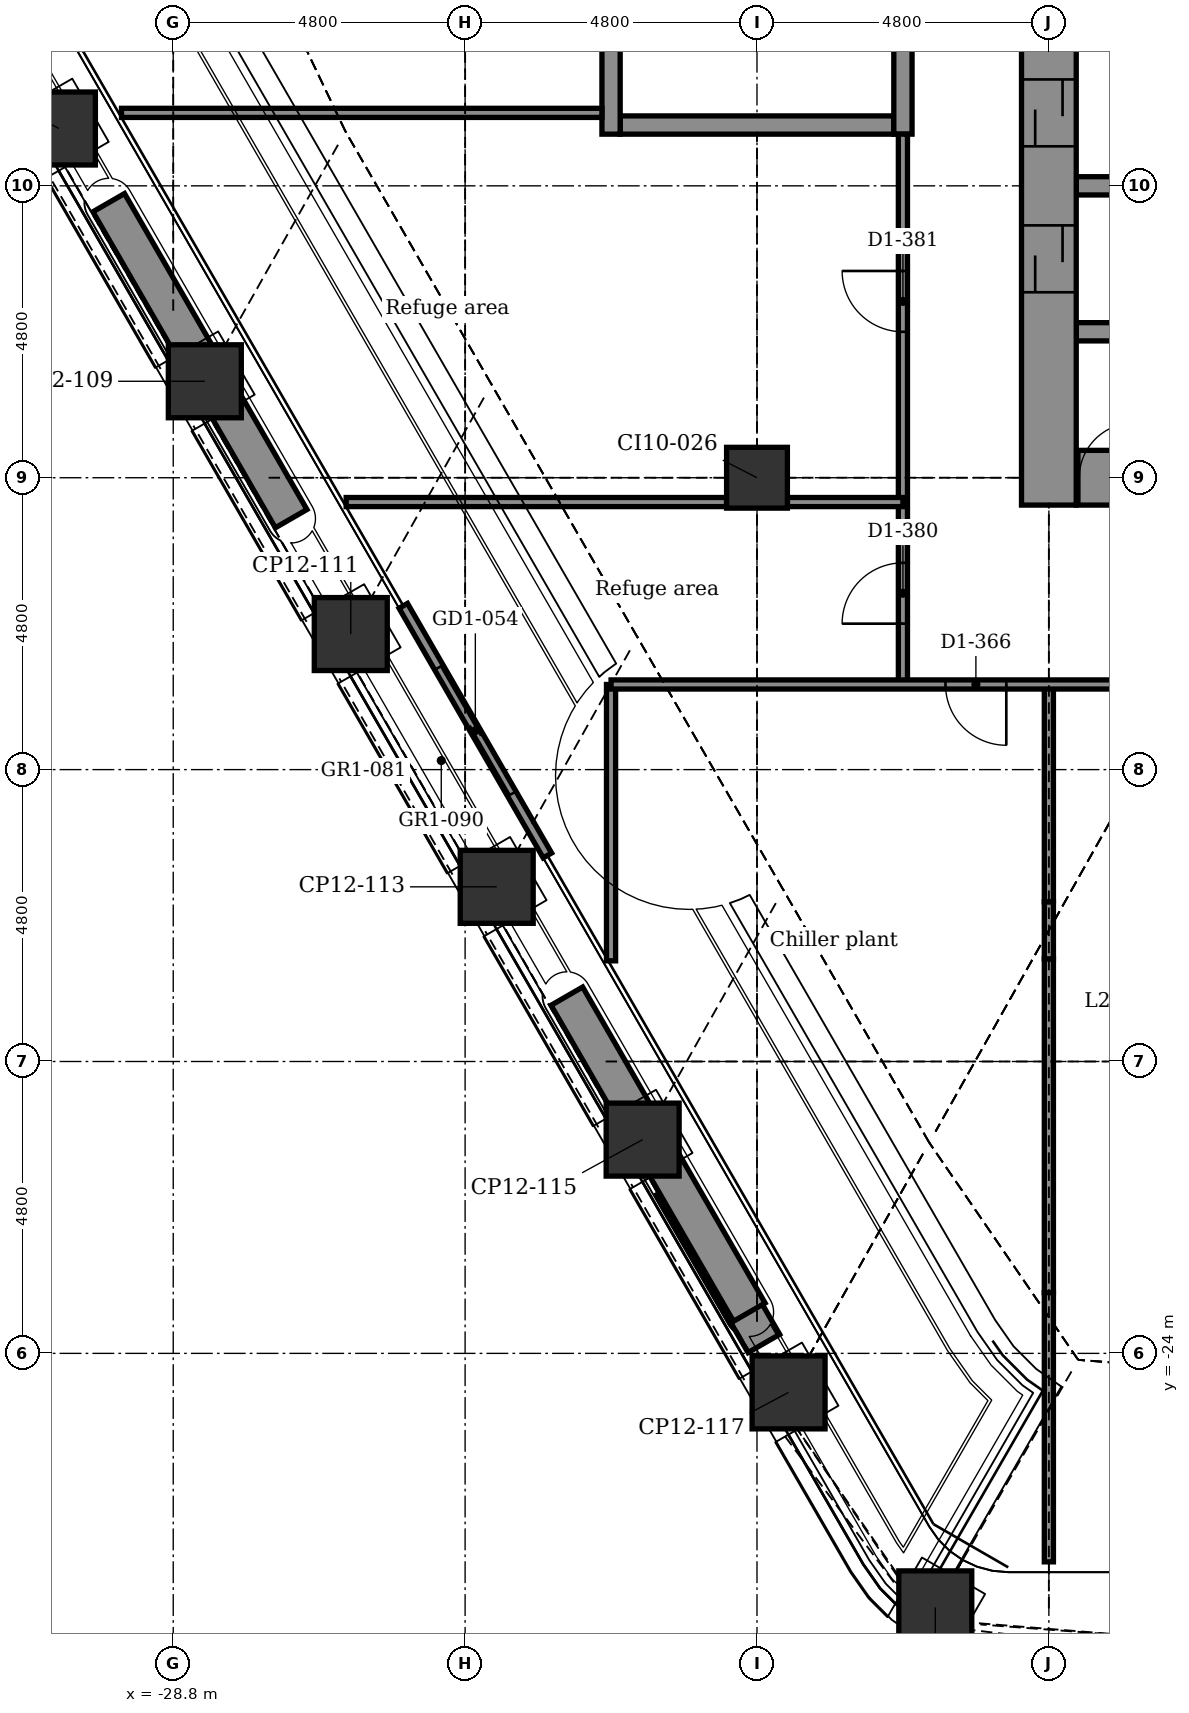
"""IFC4 building model, lengths in metres.
Left out: names, types, materials, properties, quantities, classifications, styles, units other than length and angle.
Written with IfcOpenShell. Run it as: python <this file> out.ifc"""

import sys

from ifc_helpers import new_model, si_unit, direction, frame, frame_2d, origin, origin_2d, place, context, subcontext, project, spatial, rectangle, extrude, element, fill, save


model = new_model("IFC4")
c1 = context("Model", 3, precision=1e-05, world=origin(), true_north=direction((0.0, 1.0)))
c2 = subcontext(c1, "Body", "Model", "MODEL_VIEW")
j1 = project(units=[si_unit("LENGTHUNIT", "METRE"), si_unit("PLANEANGLEUNIT", "RADIAN")], contexts=[c1])
p1 = place(None, origin())
s1 = spatial("IfcSite", under=j1, at=p1, CompositionType="ELEMENT")
p2 = place(p1, origin())
s2 = spatial("IfcBuilding", under=s1, at=p2, CompositionType="ELEMENT")
p3 = place(p2, frame((0.0, 0.0, 127.4)))
s3 = spatial("IfcBuildingStorey", under=s2, at=p3, CompositionType="ELEMENT", Elevation=127.4)
for number, where, z_axis, x_axis in (
    (1, (-16.268, -28.177, -0.3), (0.0, 0.0, 1.0), (0.5, 0.866, 0.0)),
    (2, (-18.68, -24.642, -0.3), (0.0, 0.0, 1.0), (0.866, 0.5, 0.0)),
    (3, (-21.08, -20.485, -0.3), (0.0, 0.0, 1.0), (0.866, 0.5, 0.0)),
    (4, (-23.48, -16.328, -0.3), (0.0, 0.0, 1.0), (0.866, 0.5, 0.0)),
    (5, (-25.88, -12.171, -0.3), (0.0, 0.0, 1.0), (0.866, 0.5, 0.0)),
    (6, (-28.28, -8.014, -0.3), (0.0, 0.0, 1.0), (0.866, 0.5, 0.0)),
    (7, (-30.68, -3.857, -0.3), (0.0, 0.0, 1.0), (0.866, 0.5, 0.0)),
):
    element("IfcColumn", number, at=place(p3, frame(where, z_axis=z_axis, x_axis=x_axis)), inside=s3, PredefinedType="COLUMN", context=c2, shape_type="SweptSolid", body=[
        extrude(rectangle(XDim=1.2, YDim=1.2, at=origin_2d()), origin(), (0.0, 0.0, 1.0), 6.15),
    ])
p4 = place(p3, frame((-19.2, -9.6, -0.3), z_axis=(0.0, 0.0, 1.0), x_axis=(1.0, 0.0, 0.0)))
e8 = element("IfcColumn", 8, at=p4, inside=s3, PredefinedType="COLUMN", context=c2, shape_type="SweptSolid", body=[
    extrude(rectangle(XDim=1.0, YDim=1.0, at=origin_2d()), origin(), (0.0, 0.0, 1.0), 6.15),
])
p5 = place(p3, frame((-13.95, -9.6, -0.3), z_axis=(0.0, 0.0, 1.0), x_axis=(1.0, 0.0, 0.0)))
e9 = element("IfcWall", 9, at=p5, inside=s3, PredefinedType="SHEAR", context=c2, shape_type="SweptSolid", body=[
    extrude(rectangle(XDim=3.9, YDim=0.9, at=frame_2d((1.95, 0.0))), origin(), (0.0, 0.0, 1.0), 6.15),
])
p6 = place(p5, frame((0.05, 0.0, 0.3)))
e10 = element("IfcOpeningElement", 10, at=p6, cuts=e9, PredefinedType="OPENING", context=c2, shape_type="SweptSolid", body=[
    extrude(rectangle(XDim=0.9, YDim=2.1, at=frame_2d((0.45, 1.05))), frame((0.0, 0.46, 0.0), z_axis=(0.0, -1.0, 0.0), x_axis=(1.0, 0.0, 0.0)), (0.0, 0.0, 1.0), 0.92),
])
p7 = place(p5, frame((1.5, 0.0, 0.3)))
e11 = element("IfcOpeningElement", 11, at=p7, cuts=e9, PredefinedType="OPENING", context=c2, shape_type="SweptSolid", body=[
    extrude(rectangle(XDim=0.9, YDim=2.1, at=frame_2d((0.45, 1.05))), frame((0.0, 0.46, 0.0), z_axis=(0.0, -1.0, 0.0), x_axis=(1.0, 0.0, 0.0)), (0.0, 0.0, 1.0), 0.92),
])
p8 = place(p5, frame((2.95, 0.0, 0.3)))
e12 = element("IfcOpeningElement", 12, at=p8, cuts=e9, PredefinedType="OPENING", context=c2, shape_type="SweptSolid", body=[
    extrude(rectangle(XDim=0.9, YDim=2.1, at=frame_2d((0.45, 1.05))), frame((0.0, 0.46, 0.0), z_axis=(0.0, -1.0, 0.0), x_axis=(1.0, 0.0, 0.0)), (0.0, 0.0, 1.0), 0.92),
])
p9 = place(p3, frame((-13.95, -7.2, -0.3), z_axis=(0.0, 0.0, 1.0), x_axis=(1.0, 0.0, 0.0)))
e13 = element("IfcWall", 13, at=p9, inside=s3, PredefinedType="STANDARD", context=c2, shape_type="SweptSolid", body=[
    extrude(rectangle(XDim=3.9, YDim=0.3, at=frame_2d((1.95, 0.0))), origin(), (0.0, 0.0, 1.0), 6.15),
])
p10 = place(p3, frame((-13.95, -4.8, -0.3), z_axis=(0.0, 0.0, 1.0), x_axis=(1.0, 0.0, 0.0)))
e14 = element("IfcWall", 14, at=p10, inside=s3, PredefinedType="STANDARD", context=c2, shape_type="SweptSolid", body=[
    extrude(rectangle(XDim=3.9, YDim=0.3, at=frame_2d((1.95, 0.0))), origin(), (0.0, 0.0, 1.0), 4.7),
])
p11 = place(p3, frame((-21.45, -3.8, -0.3), z_axis=(0.0, 0.0, 1.0), x_axis=(1.0, 0.0, 0.0)))
e15 = element("IfcWall", 15, at=p11, inside=s3, PredefinedType="STANDARD", context=c2, shape_type="SweptSolid", body=[
    extrude(rectangle(XDim=4.5, YDim=0.3, at=frame_2d((2.25, 0.0))), origin(), (0.0, 0.0, 1.0), 6.15),
])
p12 = place(p3, frame((-21.6, -3.95, -0.3), z_axis=(0.0, 0.0, 1.0), x_axis=(0.0, 1.0, 0.0)))
e16 = element("IfcWall", 16, at=p12, inside=s3, PredefinedType="STANDARD", context=c2, shape_type="SweptSolid", body=[
    extrude(rectangle(XDim=7.9, YDim=0.3, at=frame_2d((3.95, 0.0))), origin(), (0.0, 0.0, 1.0), 6.15),
])
p13 = place(p3, frame((-16.8, -3.95, -0.3), z_axis=(0.0, 0.0, 1.0), x_axis=(0.0, 1.0, 0.0)))
e17 = element("IfcWall", 17, at=p13, inside=s3, PredefinedType="STANDARD", context=c2, shape_type="SweptSolid", body=[
    extrude(rectangle(XDim=7.9, YDim=0.3, at=frame_2d((3.95, 0.0))), origin(), (0.0, 0.0, 1.0), 6.15),
])
p14 = place(p13, frame((6.35, 0.0, 0.3)))
e18 = element("IfcOpeningElement", 18, at=p14, cuts=e17, PredefinedType="OPENING", context=c2, shape_type="SweptSolid", body=[
    extrude(rectangle(XDim=1.2, YDim=2.1, at=frame_2d((0.6, 1.05))), frame((0.0, 0.16, 0.0), z_axis=(0.0, -1.0, 0.0), x_axis=(1.0, 0.0, 0.0)), (0.0, 0.0, 1.0), 0.32),
])
p15 = place(p3, frame((-14.4, -10.05, -0.3), z_axis=(0.0, 0.0, 1.0), x_axis=(0.0, 1.0, 0.0)))
e19 = element("IfcWall", 19, at=p15, inside=s3, PredefinedType="SHEAR", context=c2, shape_type="SweptSolid", body=[
    extrude(rectangle(XDim=20.1, YDim=0.9, at=frame_2d((10.05, 0.0))), origin(), (0.0, 0.0, 1.0), 6.15),
])
p16 = place(p15, frame((3.5, 0.0, 0.3)))
e20 = element("IfcOpeningElement", 20, at=p16, cuts=e19, PredefinedType="OPENING", context=c2, shape_type="SweptSolid", body=[
    extrude(rectangle(XDim=1.1, YDim=2.1, at=frame_2d((0.55, 1.05))), frame((0.0, 0.46, 0.0), z_axis=(0.0, -1.0, 0.0), x_axis=(1.0, 0.0, 0.0)), (0.0, 0.0, 1.0), 0.92),
])
p17 = place(p15, frame((5.9, 0.0, 0.3)))
e21 = element("IfcOpeningElement", 21, at=p17, cuts=e19, PredefinedType="OPENING", context=c2, shape_type="SweptSolid", body=[
    extrude(rectangle(XDim=1.1, YDim=2.1, at=frame_2d((0.55, 1.05))), frame((0.0, 0.46, 0.0), z_axis=(0.0, -1.0, 0.0), x_axis=(1.0, 0.0, 0.0)), (0.0, 0.0, 1.0), 0.92),
])
p18 = place(p15, frame((8.3, 0.0, 0.3)))
e22 = element("IfcOpeningElement", 22, at=p18, cuts=e19, PredefinedType="OPENING", context=c2, shape_type="SweptSolid", body=[
    extrude(rectangle(XDim=1.1, YDim=2.1, at=frame_2d((0.55, 1.05))), frame((0.0, 0.46, 0.0), z_axis=(0.0, -1.0, 0.0), x_axis=(1.0, 0.0, 0.0)), (0.0, 0.0, 1.0), 0.92),
])
p19 = place(p15, frame((10.7, 0.0, 0.3)))
e23 = element("IfcOpeningElement", 23, at=p19, cuts=e19, PredefinedType="OPENING", context=c2, shape_type="SweptSolid", body=[
    extrude(rectangle(XDim=1.1, YDim=2.1, at=frame_2d((0.55, 1.05))), frame((0.0, 0.46, 0.0), z_axis=(0.0, -1.0, 0.0), x_axis=(1.0, 0.0, 0.0)), (0.0, 0.0, 1.0), 0.92),
])
p20 = place(p3, frame((-22.647, -15.812, 0.0), z_axis=(0.0, 0.0, 1.0), x_axis=(-0.499978080042, 0.866038058908, 0.0)))
e24 = element("IfcWall", 24, at=p20, inside=s3, PredefinedType="PARTITIONING", context=c2, shape_type="SweptSolid", body=[
    extrude(rectangle(XDim=4.74, YDim=0.16, at=frame_2d((2.37, 0.0))), origin(), (0.0, 0.0, 1.0), 5.7),
])
p21 = place(p20, frame((1.17, 0.0, 0.0)))
e25 = element("IfcOpeningElement", 25, at=p21, cuts=e24, PredefinedType="OPENING", context=c2, shape_type="SweptSolid", body=[
    extrude(rectangle(XDim=2.4, YDim=2.4, at=frame_2d((1.2, 1.2))), frame((0.0, 0.09, 0.0), z_axis=(0.0, -1.0, 0.0), x_axis=(1.0, 0.0, 0.0)), (0.0, 0.0, 1.0), 0.18),
])
p22 = place(p3, frame((-19.087, -23.837, 0.0), z_axis=(0.0, 0.0, 1.0), x_axis=(-0.499990139034, 0.866031096941, 0.0)))
e26 = element("IfcWall", 26, at=p22, inside=s3, PredefinedType="USERDEFINED", context=c2, shape_type="SweptSolid", body=[
    extrude(rectangle(XDim=3.0, YDim=0.6, at=frame_2d((1.5, 0.0))), origin(), (0.0, 0.0, 1.0), 0.7),
])
for number, where, z_axis, x_axis in (
    (27, (-19.327, -23.322, 6.0), (0.0, 0.0, 1.0), (-0.5, 0.866, 0.0)),
    (28, (-26.861, -10.273, 6.0), (0.0, 0.0, 1.0), (-0.5, 0.866, 0.0)),
):
    element("IfcWall", number, at=place(p3, frame(where, z_axis=z_axis, x_axis=x_axis)), inside=s3, PredefinedType="USERDEFINED", context=c2, shape_type="SweptSolid", body=[
        extrude(rectangle(XDim=6.0, YDim=0.6, at=frame_2d((3.0, 0.0))), origin(), (0.0, 0.0, 1.0), 0.7),
    ])
p23 = place(p3, frame((-14.4, -23.001, 0.0), z_axis=(0.0, 0.0, 1.0), x_axis=(0.0, 1.0, 0.0)))
e29 = element("IfcWall", 29, at=p23, inside=s3, PredefinedType="PARTITIONING", context=c2, shape_type="SweptSolid", body=[
    extrude(rectangle(XDim=5.489, YDim=0.15, at=frame_2d((2.745, 0.0))), origin(), (0.0, 0.0, 1.0), 5.54),
])
p24 = place(p3, frame((-14.4, -27.428, 0.0), z_axis=(0.0, 0.0, 1.0), x_axis=(0.0, 1.0, 0.0)))
e30 = element("IfcWall", 30, at=p24, inside=s3, PredefinedType="PARTITIONING", context=c2, shape_type="SweptSolid", body=[
    extrude(rectangle(XDim=4.427, YDim=0.15, at=frame_2d((2.213, 0.0))), origin(), (0.0, 0.0, 1.0), 5.7),
])
p25 = place(p3, frame((-14.4, -17.512, 0.0), z_axis=(0.0, 0.0, 1.0), x_axis=(0.0, 1.0, 0.0)))
e31 = element("IfcWall", 31, at=p25, inside=s3, PredefinedType="PARTITIONING", context=c2, shape_type="SweptSolid", body=[
    extrude(rectangle(XDim=0.939, YDim=0.15, at=frame_2d((0.469, 0.0))), origin(), (0.0, 0.0, 1.0), 5.7),
])
p26 = place(p3, frame((-14.4, -16.573, 0.0), z_axis=(0.0, 0.0, 1.0), x_axis=(0.0, 1.0, 0.0)))
e32 = element("IfcWall", 32, at=p26, inside=s3, PredefinedType="PARTITIONING", context=c2, shape_type="SweptSolid", body=[
    extrude(rectangle(XDim=3.573, YDim=0.15, at=frame_2d((1.787, 0.0))), origin(), (0.0, 0.0, 1.0), 5.54),
])
p27 = place(p3, frame((-16.8, -13.0, 0.0), z_axis=(0.0, 0.0, 1.0), x_axis=(0.0, 1.0, 0.0)))
e33 = element("IfcWall", 33, at=p27, inside=s3, PredefinedType="PARTITIONING", context=c2, shape_type="SweptSolid", body=[
    extrude(rectangle(XDim=9.05, YDim=0.15, at=frame_2d((4.525, 0.0))), origin(), (0.0, 0.0, 1.0), 5.85),
])
p28 = place(p27, frame((1.0, 0.0, 0.0)))
e34 = element("IfcOpeningElement", 34, at=p28, cuts=e33, PredefinedType="OPENING", context=c2, shape_type="SweptSolid", body=[
    extrude(rectangle(XDim=1.0, YDim=2.1, at=frame_2d((0.5, 1.05))), frame((0.0, 0.085, 0.0), z_axis=(0.0, -1.0, 0.0), x_axis=(1.0, 0.0, 0.0)), (0.0, 0.0, 1.0), 0.17),
])
p29 = place(p27, frame((5.8, 0.0, 0.0)))
e35 = element("IfcOpeningElement", 35, at=p29, cuts=e33, PredefinedType="OPENING", context=c2, shape_type="SweptSolid", body=[
    extrude(rectangle(XDim=1.0, YDim=2.1, at=frame_2d((0.5, 1.05))), frame((0.0, 0.085, 0.0), z_axis=(0.0, -1.0, 0.0), x_axis=(1.0, 0.0, 0.0)), (0.0, 0.0, 1.0), 0.17),
])
p30 = place(p3, frame((-21.6, -17.545, 0.0), z_axis=(0.0, 0.0, 1.0), x_axis=(0.0, 1.0, 0.0)))
e36 = element("IfcWall", 36, at=p30, inside=s3, PredefinedType="PARTITIONING", context=c2, shape_type="SweptSolid", body=[
    extrude(rectangle(XDim=4.545, YDim=0.15, at=frame_2d((2.272, 0.0))), origin(), (0.0, 0.0, 1.0), 5.7),
])
p31 = place(p3, frame((-21.6, -13.0, 0.0), z_axis=(0.0, 0.0, 1.0), x_axis=(1.0, 0.0, 0.0)))
e37 = element("IfcWall", 37, at=p31, inside=s3, PredefinedType="PARTITIONING", context=c2, shape_type="SweptSolid", body=[
    extrude(rectangle(XDim=43.2, YDim=0.15, at=frame_2d((21.6, 0.0))), origin(), (0.0, 0.0, 1.0), 5.7),
])
p32 = place(p31, frame((5.5, 0.0, 0.0)))
e38 = element("IfcOpeningElement", 38, at=p32, cuts=e37, PredefinedType="OPENING", context=c2, shape_type="SweptSolid", body=[
    extrude(rectangle(XDim=1.0, YDim=2.1, at=frame_2d((0.5, 1.05))), frame((0.0, 0.085, 0.0), z_axis=(0.0, -1.0, 0.0), x_axis=(1.0, 0.0, 0.0)), (0.0, 0.0, 1.0), 0.17),
])
p33 = place(p31, frame((10.425, 0.0, 0.0)))
e39 = element("IfcOpeningElement", 39, at=p33, cuts=e37, PredefinedType="OPENING", context=c2, shape_type="SweptSolid", body=[
    extrude(rectangle(XDim=1.0, YDim=2.1, at=frame_2d((0.5, 1.05))), frame((0.0, 0.085, 0.0), z_axis=(0.0, -1.0, 0.0), x_axis=(1.0, 0.0, 0.0)), (0.0, 0.0, 1.0), 0.17),
])
p34 = place(p31, frame((16.955, 0.0, 0.0)))
e40 = element("IfcOpeningElement", 40, at=p34, cuts=e37, PredefinedType="OPENING", context=c2, shape_type="SweptSolid", body=[
    extrude(rectangle(XDim=1.0, YDim=2.1, at=frame_2d((0.5, 1.05))), frame((0.0, 0.085, 0.0), z_axis=(0.0, -1.0, 0.0), x_axis=(1.0, 0.0, 0.0)), (0.0, 0.0, 1.0), 0.17),
])
p35 = place(p31, frame((19.9, 0.0, 0.0)))
e41 = element("IfcOpeningElement", 41, at=p35, cuts=e37, PredefinedType="OPENING", context=c2, shape_type="SweptSolid", body=[
    extrude(rectangle(XDim=1.0, YDim=2.1, at=frame_2d((0.5, 1.05))), frame((0.0, 0.085, 0.0), z_axis=(0.0, -1.0, 0.0), x_axis=(1.0, 0.0, 0.0)), (0.0, 0.0, 1.0), 0.17),
])
p36 = place(p31, frame((22.3, 0.0, 0.0)))
e42 = element("IfcOpeningElement", 42, at=p36, cuts=e37, PredefinedType="OPENING", context=c2, shape_type="SweptSolid", body=[
    extrude(rectangle(XDim=1.0, YDim=2.1, at=frame_2d((0.5, 1.05))), frame((0.0, 0.085, 0.0), z_axis=(0.0, -1.0, 0.0), x_axis=(1.0, 0.0, 0.0)), (0.0, 0.0, 1.0), 0.17),
])
p37 = place(p31, frame((24.7, 0.0, 0.0)))
e43 = element("IfcOpeningElement", 43, at=p37, cuts=e37, PredefinedType="OPENING", context=c2, shape_type="SweptSolid", body=[
    extrude(rectangle(XDim=1.0, YDim=2.1, at=frame_2d((0.5, 1.05))), frame((0.0, 0.085, 0.0), z_axis=(0.0, -1.0, 0.0), x_axis=(1.0, 0.0, 0.0)), (0.0, 0.0, 1.0), 0.17),
])
p38 = place(p31, frame((28.3, 0.0, 0.0)))
e44 = element("IfcOpeningElement", 44, at=p38, cuts=e37, PredefinedType="OPENING", context=c2, shape_type="SweptSolid", body=[
    extrude(rectangle(XDim=1.0, YDim=2.1, at=frame_2d((0.5, 1.05))), frame((0.0, 0.085, 0.0), z_axis=(0.0, -1.0, 0.0), x_axis=(1.0, 0.0, 0.0)), (0.0, 0.0, 1.0), 0.17),
])
p39 = place(p31, frame((31.725, 0.0, 0.0)))
e45 = element("IfcOpeningElement", 45, at=p39, cuts=e37, PredefinedType="OPENING", context=c2, shape_type="SweptSolid", body=[
    extrude(rectangle(XDim=1.0, YDim=2.1, at=frame_2d((0.5, 1.05))), frame((0.0, 0.085, 0.0), z_axis=(0.0, -1.0, 0.0), x_axis=(1.0, 0.0, 0.0)), (0.0, 0.0, 1.0), 0.17),
])
p40 = place(p31, frame((35.5, 0.0, 0.0)))
e46 = element("IfcOpeningElement", 46, at=p40, cuts=e37, PredefinedType="OPENING", context=c2, shape_type="SweptSolid", body=[
    extrude(rectangle(XDim=1.0, YDim=2.1, at=frame_2d((0.5, 1.05))), frame((0.0, 0.085, 0.0), z_axis=(0.0, -1.0, 0.0), x_axis=(1.0, 0.0, 0.0)), (0.0, 0.0, 1.0), 0.17),
])
p41 = place(p3, frame((-25.956, -10.0, 0.0), z_axis=(0.0, 0.0, 1.0), x_axis=(1.0, 0.0, 0.0)))
e47 = element("IfcWall", 47, at=p41, inside=s3, PredefinedType="PARTITIONING", context=c2, shape_type="SweptSolid", body=[
    extrude(rectangle(XDim=6.256, YDim=0.15, at=frame_2d((3.128, 0.0))), origin(), (0.0, 0.0, 1.0), 5.7),
])
p42 = place(p3, frame((-18.7, -10.0, 0.0), z_axis=(0.0, 0.0, 1.0), x_axis=(1.0, 0.0, 0.0)))
e48 = element("IfcWall", 48, at=p42, inside=s3, PredefinedType="PARTITIONING", context=c2, shape_type="SweptSolid", body=[
    extrude(rectangle(XDim=1.9, YDim=0.15, at=frame_2d((0.95, 0.0))), origin(), (0.0, 0.0, 1.0), 5.85),
])
p43 = place(p3, frame((-29.651, -3.6, 0.0), z_axis=(0.0, 0.0, 1.0), x_axis=(1.0, 0.0, 0.0)))
e49 = element("IfcWall", 49, at=p43, inside=s3, PredefinedType="PARTITIONING", context=c2, shape_type="SweptSolid", body=[
    extrude(rectangle(XDim=7.901, YDim=0.15, at=frame_2d((3.95, 0.0))), origin(), (0.0, 0.0, 1.0), 5.7),
])
p44 = place(p21, origin())
e50 = element("IfcDoor", 50, at=p44, inside=s3, OperationType="DOUBLE_DOOR_SLIDING", PredefinedType="DOOR", context=c2, shape_type="SweptSolid", body=[
    extrude(rectangle(XDim=2.4, YDim=2.4, at=frame_2d((1.2, 1.2))), frame((0.0, 0.025, 0.0), z_axis=(0.0, -1.0, 0.0), x_axis=(1.0, 0.0, 0.0)), (0.0, 0.0, 1.0), 0.05),
])
fill(e25, e50)
p45 = place(p32, frame((1.0, 0.0, 0.0), z_axis=(0.0, 0.0, 1.0), x_axis=(-1.0, 0.0, 0.0)))
e51 = element("IfcDoor", 51, at=p45, inside=s3, OperationType="SINGLE_SWING_RIGHT", PredefinedType="DOOR", context=c2, shape_type="SweptSolid", body=[
    extrude(rectangle(XDim=1.0, YDim=2.1, at=frame_2d((0.5, 1.05))), frame((0.0, 0.025, 0.0), z_axis=(0.0, -1.0, 0.0), x_axis=(1.0, 0.0, 0.0)), (0.0, 0.0, 1.0), 0.05),
])
fill(e38, e51)
p46 = place(p28, origin())
e52 = element("IfcDoor", 52, at=p46, inside=s3, OperationType="SINGLE_SWING_LEFT", PredefinedType="DOOR", context=c2, shape_type="SweptSolid", body=[
    extrude(rectangle(XDim=1.0, YDim=2.1, at=frame_2d((0.5, 1.05))), frame((0.0, 0.025, 0.0), z_axis=(0.0, -1.0, 0.0), x_axis=(1.0, 0.0, 0.0)), (0.0, 0.0, 1.0), 0.05),
])
fill(e34, e52)
p47 = place(p29, origin())
e53 = element("IfcDoor", 53, at=p47, inside=s3, OperationType="SINGLE_SWING_RIGHT", PredefinedType="DOOR", context=c2, shape_type="SweptSolid", body=[
    extrude(rectangle(XDim=1.0, YDim=2.1, at=frame_2d((0.5, 1.05))), frame((0.0, 0.025, 0.0), z_axis=(0.0, -1.0, 0.0), x_axis=(1.0, 0.0, 0.0)), (0.0, 0.0, 1.0), 0.05),
])
fill(e35, e53)
p48 = place(p16, origin())
e54 = element("IfcDoor", 54, at=p48, inside=s3, OperationType="DOUBLE_DOOR_SLIDING", PredefinedType="DOOR", context=c2, shape_type="SweptSolid", body=[
    extrude(rectangle(XDim=1.1, YDim=2.1, at=frame_2d((0.55, 1.05))), frame((0.0, 0.025, 0.0), z_axis=(0.0, -1.0, 0.0), x_axis=(1.0, 0.0, 0.0)), (0.0, 0.0, 1.0), 0.05),
])
fill(e20, e54)
p49 = place(p17, origin())
e55 = element("IfcDoor", 55, at=p49, inside=s3, OperationType="DOUBLE_DOOR_SLIDING", PredefinedType="DOOR", context=c2, shape_type="SweptSolid", body=[
    extrude(rectangle(XDim=1.1, YDim=2.1, at=frame_2d((0.55, 1.05))), frame((0.0, 0.025, 0.0), z_axis=(0.0, -1.0, 0.0), x_axis=(1.0, 0.0, 0.0)), (0.0, 0.0, 1.0), 0.05),
])
fill(e21, e55)
p50 = place(p6, origin())
e56 = element("IfcDoor", 56, at=p50, inside=s3, OperationType="SINGLE_SWING_RIGHT", PredefinedType="DOOR", context=c2, shape_type="SweptSolid", body=[
    extrude(rectangle(XDim=0.9, YDim=2.1, at=frame_2d((0.45, 1.05))), frame((0.0, 0.025, 0.0), z_axis=(0.0, -1.0, 0.0), x_axis=(1.0, 0.0, 0.0)), (0.0, 0.0, 1.0), 0.05),
])
fill(e10, e56)
save(model, sys.argv[1])
